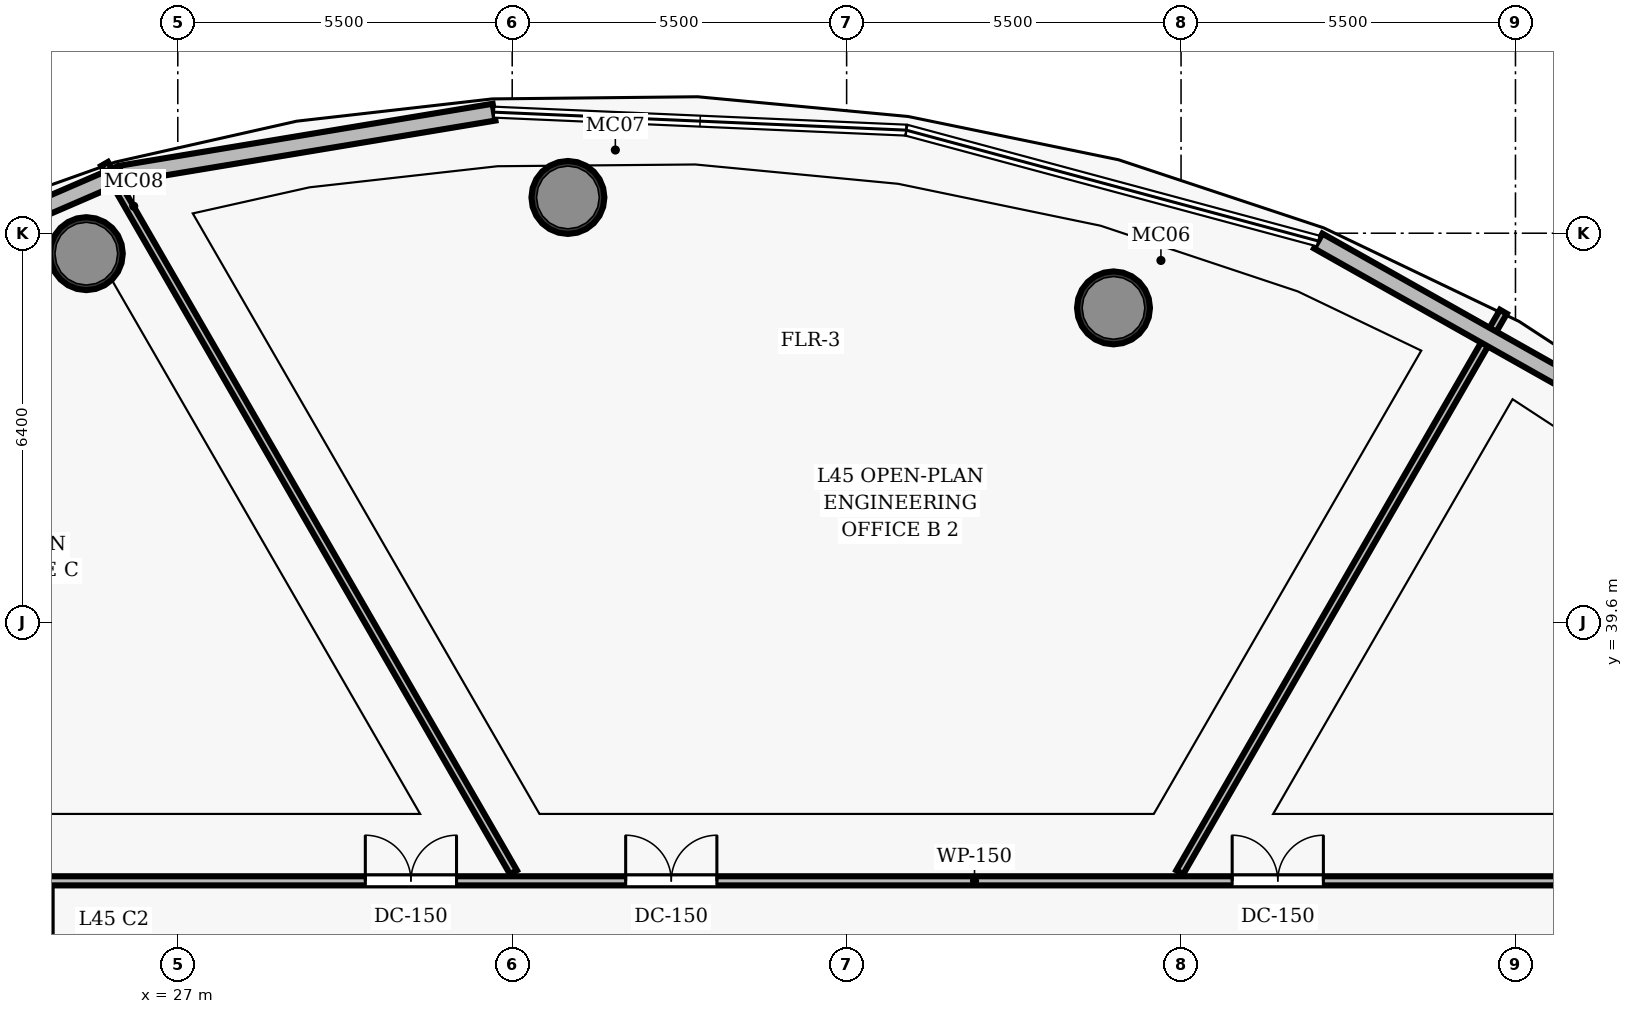
"""IFC4 building model, lengths in metres.
Left out: names, types, materials, properties, quantities, classifications, styles, units other than length and angle.
Written with IfcOpenShell. Run it as: python <this file> out.ifc"""

import sys

from ifc_helpers import new_model, si_unit, direction, frame, frame_2d, origin, origin_2d, place, context, subcontext, project, spatial, rectangle, hollow_circle, extrude, element, fill, save


model = new_model("IFC4")
c1 = context("Model", 3, precision=1e-05, world=origin(), true_north=direction((0.0, 1.0)))
c2 = subcontext(c1, "Body", "Model", "MODEL_VIEW")
j1 = project(units=[si_unit("LENGTHUNIT", "METRE"), si_unit("PLANEANGLEUNIT", "RADIAN")], contexts=[c1])
p1 = place(None, origin())
s1 = spatial("IfcSite", under=j1, at=p1, CompositionType="ELEMENT")
p2 = place(p1, origin())
s2 = spatial("IfcBuilding", under=s1, at=p2, CompositionType="ELEMENT")
p3 = place(p2, frame((0.0, 0.0, 178.9)))
s3 = spatial("IfcBuildingStorey", under=s2, at=p3, CompositionType="ELEMENT", Elevation=178.9)
for number, where, z_axis, x_axis in (
    (1, (42.389, 44.772, 0.0), (0.0, 0.0, 1.0), (1.0, 0.0, 0.0)),
    (2, (33.416, 46.588, 0.0), (0.0, 0.0, 1.0), (1.0, 0.0, 0.0)),
    (3, (25.496, 45.664, 0.0), (0.0, 0.0, 1.0), (1.0, 0.0, 0.0)),
):
    element("IfcColumn", number, at=place(p3, frame(where, z_axis=z_axis, x_axis=x_axis)), inside=s3, PredefinedType="COLUMN", context=c2, shape_type="SweptSolid", body=[
        extrude(hollow_circle(Radius=0.6, WallThickness=0.05, at=origin_2d()), origin(), (0.0, 0.0, 1.0), 3.85),
    ])
p4 = place(p3, frame((24.85, 35.35, 0.0), z_axis=(0.0, 0.0, 1.0), x_axis=(1.0, 0.0, 0.0)))
e4 = element("IfcWall", 4, at=p4, inside=s3, PredefinedType="PARTITIONING", context=c2, shape_type="SweptSolid", body=[
    extrude(rectangle(XDim=26.0, YDim=0.15, at=frame_2d((13.0, 0.0))), origin(), (0.0, 0.0, 1.0), 3.035),
])
p5 = place(p4, frame((19.491, 0.0, 0.0)))
e5 = element("IfcOpeningElement", 5, at=p5, cuts=e4, PredefinedType="OPENING", context=c2, shape_type="SweptSolid", body=[
    extrude(rectangle(XDim=1.5, YDim=2.2, at=frame_2d((0.75, 1.1))), frame((0.0, 0.085, 0.0), z_axis=(0.0, -1.0, 0.0), x_axis=(1.0, 0.0, 0.0)), (0.0, 0.0, 1.0), 0.17),
])
p6 = place(p4, frame((9.516, 0.0, 0.0)))
e6 = element("IfcOpeningElement", 6, at=p6, cuts=e4, PredefinedType="OPENING", context=c2, shape_type="SweptSolid", body=[
    extrude(rectangle(XDim=1.5, YDim=2.2, at=frame_2d((0.75, 1.1))), frame((0.0, 0.085, 0.0), z_axis=(0.0, -1.0, 0.0), x_axis=(1.0, 0.0, 0.0)), (0.0, 0.0, 1.0), 0.17),
])
p7 = place(p4, frame((5.234, 0.0, 0.0)))
e7 = element("IfcOpeningElement", 7, at=p7, cuts=e4, PredefinedType="OPENING", context=c2, shape_type="SweptSolid", body=[
    extrude(rectangle(XDim=1.5, YDim=2.2, at=frame_2d((0.75, 1.1))), frame((0.0, 0.085, 0.0), z_axis=(0.0, -1.0, 0.0), x_axis=(1.0, 0.0, 0.0)), (0.0, 0.0, 1.0), 0.17),
])
p8 = place(p3, frame((43.479, 35.49, 0.0), z_axis=(0.0, 0.0, 1.0), x_axis=(0.500004366266, 0.866022882905, 0.0)))
e8 = element("IfcWall", 8, at=p8, inside=s3, PredefinedType="PARTITIONING", context=c2, shape_type="SweptSolid", body=[
    extrude(rectangle(XDim=10.645, YDim=0.13, at=frame_2d((5.323, 0.0))), origin(), (0.0, 0.0, 1.0), 3.035),
])
p9 = place(p3, frame((32.521, 35.49, 0.0), z_axis=(0.0, 0.0, 1.0), x_axis=(-0.500004209807, 0.866022973237, 0.0)))
e9 = element("IfcWall", 9, at=p9, inside=s3, PredefinedType="PARTITIONING", context=c2, shape_type="SweptSolid", body=[
    extrude(rectangle(XDim=13.451, YDim=0.13, at=frame_2d((6.726, 0.0))), origin(), (0.0, 0.0, 1.0), 3.035),
])
p10 = place(p3, frame((45.756, 45.872, 0.0), z_axis=(0.0, 0.0, 1.0), x_axis=(0.87116433645, -0.490991546665, 0.0)))
e10 = element("IfcWall", 10, at=p10, inside=s3, PredefinedType="SOLIDWALL", context=c2, shape_type="SweptSolid", body=[
    extrude(rectangle(XDim=7.045, YDim=0.28, at=frame_2d((3.523, 0.0))), origin(), (0.0, 0.0, 1.0), 3.62),
])
p11 = place(p3, frame((26.059, 46.971, 0.0), z_axis=(0.0, 0.0, 1.0), x_axis=(0.986490190097, 0.163820343186, 0.0)))
e11 = element("IfcWall", 11, at=p11, inside=s3, PredefinedType="SOLIDWALL", context=c2, shape_type="SweptSolid", body=[
    extrude(rectangle(XDim=6.227, YDim=0.28, at=frame_2d((3.113, 0.0))), origin(), (0.0, 0.0, 1.0), 3.62),
])
p12 = place(p3, frame((21.044, 44.801, 0.0), z_axis=(0.0, 0.0, 1.0), x_axis=(0.917783118747, 0.39708204057, 0.0)))
e12 = element("IfcWall", 12, at=p12, inside=s3, PredefinedType="SOLIDWALL", context=c2, shape_type="SweptSolid", body=[
    extrude(rectangle(XDim=5.465, YDim=0.28, at=frame_2d((2.732, 0.0))), origin(), (0.0, 0.0, 1.0), 3.62),
])
p13 = place(p5, origin())
e13 = element("IfcDoor", 13, at=p13, inside=s3, OperationType="DOUBLE_DOOR_SINGLE_SWING", PredefinedType="DOOR", context=c2, shape_type="SweptSolid", body=[
    extrude(rectangle(XDim=1.5, YDim=2.2, at=frame_2d((0.75, 1.1))), frame((0.0, 0.025, 0.0), z_axis=(0.0, -1.0, 0.0), x_axis=(1.0, 0.0, 0.0)), (0.0, 0.0, 1.0), 0.05),
])
fill(e5, e13)
p14 = place(p6, origin())
e14 = element("IfcDoor", 14, at=p14, inside=s3, OperationType="DOUBLE_DOOR_SINGLE_SWING", PredefinedType="DOOR", context=c2, shape_type="SweptSolid", body=[
    extrude(rectangle(XDim=1.5, YDim=2.2, at=frame_2d((0.75, 1.1))), frame((0.0, 0.025, 0.0), z_axis=(0.0, -1.0, 0.0), x_axis=(1.0, 0.0, 0.0)), (0.0, 0.0, 1.0), 0.05),
])
fill(e6, e14)
p15 = place(p7, origin())
e15 = element("IfcDoor", 15, at=p15, inside=s3, OperationType="DOUBLE_DOOR_SINGLE_SWING", PredefinedType="DOOR", context=c2, shape_type="SweptSolid", body=[
    extrude(rectangle(XDim=1.5, YDim=2.2, at=frame_2d((0.75, 1.1))), frame((0.0, 0.025, 0.0), z_axis=(0.0, -1.0, 0.0), x_axis=(1.0, 0.0, 0.0)), (0.0, 0.0, 1.0), 0.05),
])
fill(e7, e15)
save(model, sys.argv[1])
